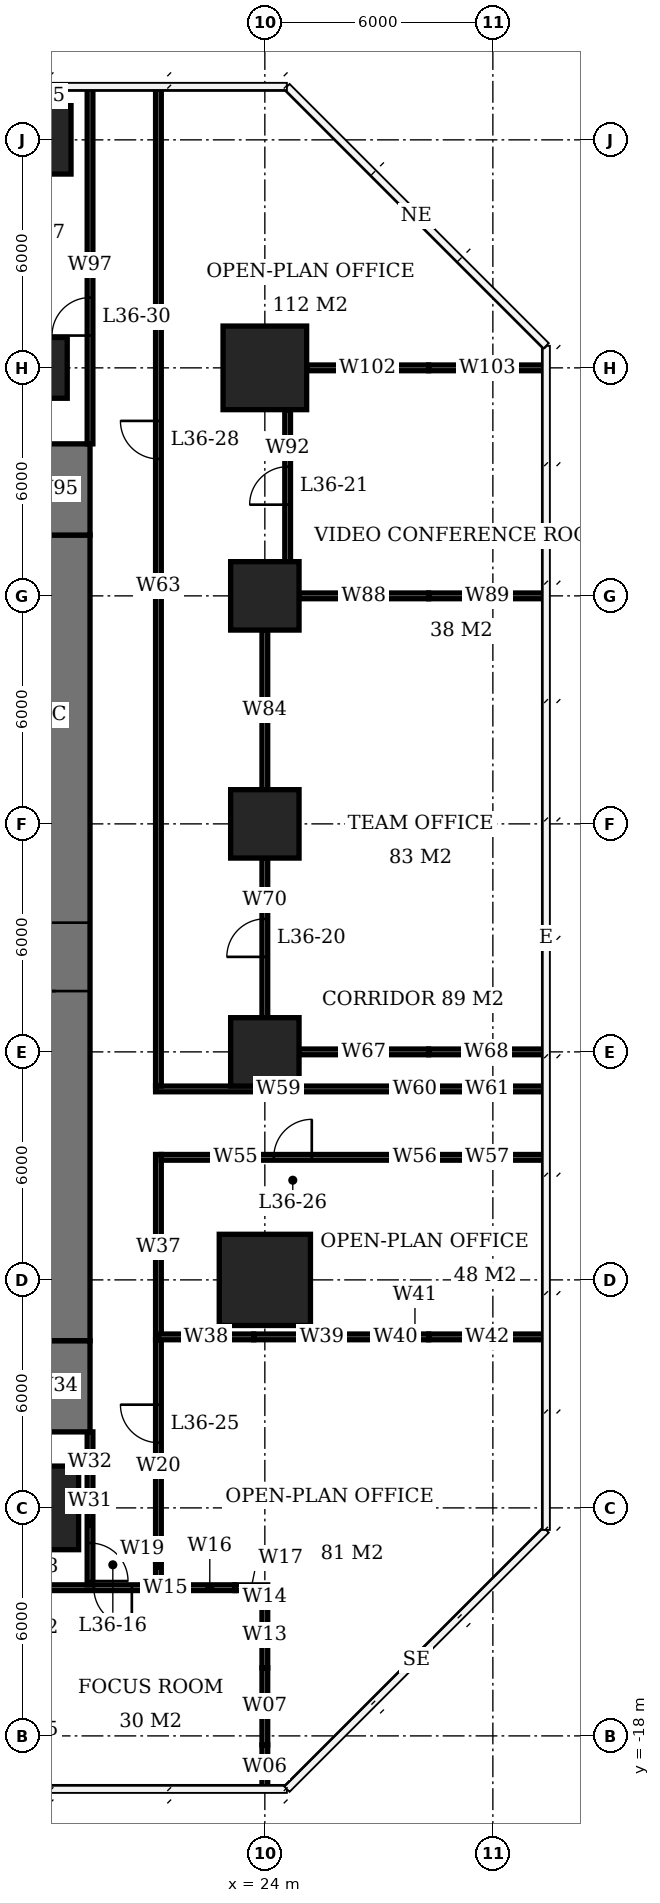
"""IFC4 building model, lengths in metres.
Left out: names, types, materials, properties, quantities, classifications, styles, units other than length and angle.
Written with IfcOpenShell. Run it as: python <this file> out.ifc"""

import sys

from ifc_helpers import new_model, si_unit, direction, frame, frame_2d, origin, origin_2d, place, context, subcontext, project, spatial, rectangle, extrude, element, fill, save


model = new_model("IFC4")
c1 = context("Model", 3, precision=1e-05, world=origin(), true_north=direction((0.0, 1.0)))
c2 = subcontext(c1, "Body", "Model", "MODEL_VIEW")
j1 = project(units=[si_unit("LENGTHUNIT", "METRE"), si_unit("PLANEANGLEUNIT", "RADIAN")], contexts=[c1])
p1 = place(None, origin())
s1 = spatial("IfcSite", under=j1, at=p1, CompositionType="ELEMENT")
p2 = place(p1, origin())
s2 = spatial("IfcBuilding", under=s1, at=p2, CompositionType="ELEMENT")
p3 = place(p2, frame((0.0, 0.0, 148.4)))
s3 = spatial("IfcBuildingStorey", under=s2, at=p3, CompositionType="ELEMENT", Elevation=148.4)
p4 = place(p3, frame((18.0, -12.0, 0.0), z_axis=(0.0, 0.0, 1.0), x_axis=(1.0, 0.0, 0.0)))
e1 = element("IfcColumn", 1, at=p4, inside=s3, PredefinedType="COLUMN", context=c2, shape_type="SweptSolid", body=[
    extrude(rectangle(XDim=2.2, YDim=2.2, at=origin_2d()), origin(), (0.0, 0.0, 1.0), 3.9),
])
p5 = place(p3, frame((18.0, 18.0, 0.0), z_axis=(0.0, 0.0, 1.0), x_axis=(1.0, 0.0, 0.0)))
e2 = element("IfcColumn", 2, at=p5, inside=s3, PredefinedType="COLUMN", context=c2, shape_type="SweptSolid", body=[
    extrude(rectangle(XDim=1.6, YDim=1.6, at=origin_2d()), origin(), (0.0, 0.0, 1.0), 3.9),
])
p6 = place(p3, frame((18.0, 24.0, 0.0), z_axis=(0.0, 0.0, 1.0), x_axis=(1.0, 0.0, 0.0)))
e3 = element("IfcColumn", 3, at=p6, inside=s3, PredefinedType="COLUMN", context=c2, shape_type="SweptSolid", body=[
    extrude(rectangle(XDim=1.8, YDim=1.8, at=origin_2d()), origin(), (0.0, 0.0, 1.0), 3.9),
])
p7 = place(p3, frame((24.0, -6.0, 0.0), z_axis=(0.0, 0.0, 1.0), x_axis=(1.0, 0.0, 0.0)))
e4 = element("IfcColumn", 4, at=p7, inside=s3, PredefinedType="COLUMN", context=c2, shape_type="SweptSolid", body=[
    extrude(rectangle(XDim=2.4, YDim=2.4, at=origin_2d()), origin(), (0.0, 0.0, 1.0), 3.9),
])
for number, where, z_axis, x_axis in (
    (5, (24.0, 0.0, 0.0), (0.0, 0.0, 1.0), (1.0, 0.0, 0.0)),
    (6, (24.0, 6.0, 0.0), (0.0, 0.0, 1.0), (1.0, 0.0, 0.0)),
    (7, (24.0, 12.0, 0.0), (0.0, 0.0, 1.0), (1.0, 0.0, 0.0)),
):
    element("IfcColumn", number, at=place(p3, frame(where, z_axis=z_axis, x_axis=x_axis)), inside=s3, PredefinedType="COLUMN", context=c2, shape_type="SweptSolid", body=[
        extrude(rectangle(XDim=1.8, YDim=1.8, at=origin_2d()), origin(), (0.0, 0.0, 1.0), 3.9),
    ])
p8 = place(p3, frame((24.0, 18.0, 0.0), z_axis=(0.0, 0.0, 1.0), x_axis=(1.0, 0.0, 0.0)))
e8 = element("IfcColumn", 8, at=p8, inside=s3, PredefinedType="COLUMN", context=c2, shape_type="SweptSolid", body=[
    extrude(rectangle(XDim=2.2, YDim=2.2, at=origin_2d()), origin(), (0.0, 0.0, 1.0), 3.9),
])
p9 = place(p3, frame((18.5, -7.6, 0.0), z_axis=(0.0, 0.0, 1.0), x_axis=(0.0, 1.0, 0.0)))
e9 = element("IfcWall", 9, at=p9, inside=s3, PredefinedType="SHEAR", context=c2, shape_type="SweptSolid", body=[
    extrude(rectangle(XDim=21.2, YDim=1.8, at=frame_2d((10.6, 0.0))), origin(), (0.0, 0.0, 1.0), 3.9),
])
p10 = place(p9, frame((9.2, 0.0, 0.0)))
e10 = element("IfcOpeningElement", 10, at=p10, cuts=e9, PredefinedType="OPENING", context=c2, shape_type="SweptSolid", body=[
    extrude(rectangle(XDim=1.8, YDim=2.4, at=frame_2d((0.9, 1.2))), frame((0.0, 0.91, 0.0), z_axis=(0.0, -1.0, 0.0), x_axis=(1.0, 0.0, 0.0)), (0.0, 0.0, 1.0), 1.82),
])
for number, where, z_axis, x_axis in (
    (11, (18.5, -10.0, 0.0), (0.0, 0.0, 1.0), (0.0, 1.0, 0.0)),
    (12, (18.5, 13.6, 0.0), (0.0, 0.0, 1.0), (0.0, 1.0, 0.0)),
):
    element("IfcWall", number, at=place(p3, frame(where, z_axis=z_axis, x_axis=x_axis)), inside=s3, PredefinedType="SHEAR", context=c2, shape_type="SweptSolid", body=[
        extrude(rectangle(XDim=2.4, YDim=1.8, at=frame_2d((1.2, 0.0))), origin(), (0.0, 0.0, 1.0), 3.9),
    ])
p11 = place(p3, frame((21.892, -14.1, 0.0), z_axis=(0.0, 0.0, 1.0), x_axis=(-1.0, 0.0, 0.0)))
e13 = element("IfcWall", 13, at=p11, inside=s3, PredefinedType="PARTITIONING", context=c2, shape_type="SweptSolid", body=[
    extrude(rectangle(XDim=3.817, YDim=0.15, at=frame_2d((1.909, 0.0))), origin(), (0.0, 0.0, 1.0), 2.65),
])
p12 = place(p11, frame((1.392, 0.0, 0.0)))
e14 = element("IfcOpeningElement", 14, at=p12, cuts=e13, PredefinedType="OPENING", context=c2, shape_type="SweptSolid", body=[
    extrude(rectangle(XDim=1.0, YDim=2.1, at=frame_2d((0.5, 1.05))), frame((0.0, 0.085, 0.0), z_axis=(0.0, -1.0, 0.0), x_axis=(1.0, 0.0, 0.0)), (0.0, 0.0, 1.0), 0.17),
])
p13 = place(p3, frame((21.892, -14.1, 0.0), z_axis=(0.0, 0.0, 1.0), x_axis=(1.0, 0.0, 0.0)))
e15 = element("IfcWall", 15, at=p13, inside=s3, PredefinedType="PARTITIONING", context=c2, shape_type="SweptSolid", body=[
    extrude(rectangle(XDim=1.318, YDim=0.15, at=frame_2d((0.659, 0.0))), origin(), (0.0, 0.0, 1.0), 3.65),
])
p14 = place(p3, frame((23.21, -14.1, 0.0), z_axis=(0.0, 0.0, 1.0), x_axis=(1.0, 0.0, 0.0)))
e16 = element("IfcWall", 16, at=p14, inside=s3, PredefinedType="PARTITIONING", context=c2, shape_type="SweptSolid", body=[
    extrude(rectangle(XDim=0.865, YDim=0.15, at=frame_2d((0.433, 0.0))), origin(), (0.0, 0.0, 1.0), 2.65),
])
p15 = place(p3, frame((24.9, 0.0, 0.0), z_axis=(0.0, 0.0, 1.0), x_axis=(1.0, 0.0, 0.0)))
e17 = element("IfcWall", 17, at=p15, inside=s3, PredefinedType="PARTITIONING", context=c2, shape_type="SweptSolid", body=[
    extrude(rectangle(XDim=3.41, YDim=0.15, at=frame_2d((1.705, 0.0))), origin(), (0.0, 0.0, 1.0), 2.65),
])
p16 = place(p3, frame((28.31, 0.0, 0.0), z_axis=(0.0, 0.0, 1.0), x_axis=(1.0, 0.0, 0.0)))
e18 = element("IfcWall", 18, at=p16, inside=s3, PredefinedType="PARTITIONING", context=c2, shape_type="SweptSolid", body=[
    extrude(rectangle(XDim=3.04, YDim=0.15, at=frame_2d((1.52, 0.0))), origin(), (0.0, 0.0, 1.0), 3.65),
])
p17 = place(p3, frame((24.9, 12.0, 0.0), z_axis=(0.0, 0.0, 1.0), x_axis=(1.0, 0.0, 0.0)))
e19 = element("IfcWall", 19, at=p17, inside=s3, PredefinedType="PARTITIONING", context=c2, shape_type="SweptSolid", body=[
    extrude(rectangle(XDim=3.41, YDim=0.15, at=frame_2d((1.705, 0.0))), origin(), (0.0, 0.0, 1.0), 2.65),
])
p18 = place(p3, frame((28.31, 12.0, 0.0), z_axis=(0.0, 0.0, 1.0), x_axis=(1.0, 0.0, 0.0)))
e20 = element("IfcWall", 20, at=p18, inside=s3, PredefinedType="PARTITIONING", context=c2, shape_type="SweptSolid", body=[
    extrude(rectangle(XDim=3.09, YDim=0.15, at=frame_2d((1.545, 0.0))), origin(), (0.0, 0.0, 1.0), 3.65),
])
p19 = place(p3, frame((25.1, 18.0, 0.0), z_axis=(0.0, 0.0, 1.0), x_axis=(1.0, 0.0, 0.0)))
e21 = element("IfcWall", 21, at=p19, inside=s3, PredefinedType="PARTITIONING", context=c2, shape_type="SweptSolid", body=[
    extrude(rectangle(XDim=3.21, YDim=0.15, at=frame_2d((1.605, 0.0))), origin(), (0.0, 0.0, 1.0), 2.65),
])
p20 = place(p3, frame((28.31, 18.0, 0.0), z_axis=(0.0, 0.0, 1.0), x_axis=(1.0, 0.0, 0.0)))
e22 = element("IfcWall", 22, at=p20, inside=s3, PredefinedType="PARTITIONING", context=c2, shape_type="SweptSolid", body=[
    extrude(rectangle(XDim=3.09, YDim=0.15, at=frame_2d((1.545, 0.0))), origin(), (0.0, 0.0, 1.0), 3.65),
])
p21 = place(p3, frame((24.0, -19.4, 0.0), z_axis=(0.0, 0.0, 1.0), x_axis=(0.0, 1.0, 0.0)))
e23 = element("IfcWall", 23, at=p21, inside=s3, PredefinedType="PARTITIONING", context=c2, shape_type="SweptSolid", body=[
    extrude(rectangle(XDim=1.163, YDim=0.15, at=frame_2d((0.582, 0.0))), origin(), (0.0, 0.0, 1.0), 3.65),
])
p22 = place(p3, frame((24.0, -18.237, 0.0), z_axis=(0.0, 0.0, 1.0), x_axis=(0.0, 1.0, 0.0)))
e24 = element("IfcWall", 24, at=p22, inside=s3, PredefinedType="PARTITIONING", context=c2, shape_type="SweptSolid", body=[
    extrude(rectangle(XDim=2.029, YDim=0.15, at=frame_2d((1.015, 0.0))), origin(), (0.0, 0.0, 1.0), 2.65),
])
p23 = place(p3, frame((24.0, -16.208, 0.0), z_axis=(0.0, 0.0, 1.0), x_axis=(0.0, 1.0, 0.0)))
e25 = element("IfcWall", 25, at=p23, inside=s3, PredefinedType="PARTITIONING", context=c2, shape_type="SweptSolid", body=[
    extrude(rectangle(XDim=1.718, YDim=0.15, at=frame_2d((0.859, 0.0))), origin(), (0.0, 0.0, 1.0), 3.65),
])
p24 = place(p3, frame((24.0, -14.49, 0.0), z_axis=(0.0, 0.0, 1.0), x_axis=(0.0, 1.0, 0.0)))
e26 = element("IfcWall", 26, at=p24, inside=s3, PredefinedType="PARTITIONING", context=c2, shape_type="SweptSolid", body=[
    extrude(rectangle(XDim=0.315, YDim=0.15, at=frame_2d((0.157, 0.0))), origin(), (0.0, 0.0, 1.0), 2.65),
])
p25 = place(p3, frame((24.0, 0.9, 0.0), z_axis=(0.0, 0.0, 1.0), x_axis=(0.0, 1.0, 0.0)))
e27 = element("IfcWall", 27, at=p25, inside=s3, PredefinedType="PARTITIONING", context=c2, shape_type="SweptSolid", body=[
    extrude(rectangle(XDim=4.2, YDim=0.15, at=frame_2d((2.1, 0.0))), origin(), (0.0, 0.0, 1.0), 3.65),
])
p26 = place(p25, frame((1.6, 0.0, 0.0)))
e28 = element("IfcOpeningElement", 28, at=p26, cuts=e27, PredefinedType="OPENING", context=c2, shape_type="SweptSolid", body=[
    extrude(rectangle(XDim=1.0, YDim=2.1, at=frame_2d((0.5, 1.05))), frame((0.0, 0.085, 0.0), z_axis=(0.0, -1.0, 0.0), x_axis=(1.0, 0.0, 0.0)), (0.0, 0.0, 1.0), 0.17),
])
p27 = place(p3, frame((24.0, 6.9, 0.0), z_axis=(0.0, 0.0, 1.0), x_axis=(0.0, 1.0, 0.0)))
e29 = element("IfcWall", 29, at=p27, inside=s3, PredefinedType="PARTITIONING", context=c2, shape_type="SweptSolid", body=[
    extrude(rectangle(XDim=4.2, YDim=0.15, at=frame_2d((2.1, 0.0))), origin(), (0.0, 0.0, 1.0), 3.65),
])
p28 = place(p3, frame((24.6, 12.9, 0.0), z_axis=(0.0, 0.0, 1.0), x_axis=(0.0, 1.0, 0.0)))
e30 = element("IfcWall", 30, at=p28, inside=s3, PredefinedType="PARTITIONING", context=c2, shape_type="SweptSolid", body=[
    extrude(rectangle(XDim=4.0, YDim=0.15, at=frame_2d((2.0, 0.0))), origin(), (0.0, 0.0, 1.0), 3.65),
])
p29 = place(p28, frame((1.5, 0.0, 0.0)))
e31 = element("IfcOpeningElement", 31, at=p29, cuts=e30, PredefinedType="OPENING", context=c2, shape_type="SweptSolid", body=[
    extrude(rectangle(XDim=1.0, YDim=2.1, at=frame_2d((0.5, 1.05))), frame((0.0, 0.085, 0.0), z_axis=(0.0, -1.0, 0.0), x_axis=(1.0, 0.0, 0.0)), (0.0, 0.0, 1.0), 0.17),
])
p30 = place(p3, frame((19.4, -11.608, 0.0), z_axis=(0.0, 0.0, 1.0), x_axis=(0.0, -1.0, 0.0)))
e32 = element("IfcWall", 32, at=p30, inside=s3, PredefinedType="PARTITIONING", context=c2, shape_type="SweptSolid", body=[
    extrude(rectangle(XDim=2.417, YDim=0.15, at=frame_2d((1.208, 0.0))), origin(), (0.0, 0.0, 1.0), 2.65),
])
p31 = place(p30, frame((1.317, 0.0, 0.0)))
e33 = element("IfcOpeningElement", 33, at=p31, cuts=e32, PredefinedType="OPENING", context=c2, shape_type="SweptSolid", body=[
    extrude(rectangle(XDim=1.0, YDim=2.1, at=frame_2d((0.5, 1.05))), frame((0.0, 0.085, 0.0), z_axis=(0.0, -1.0, 0.0), x_axis=(1.0, 0.0, 0.0)), (0.0, 0.0, 1.0), 0.17),
])
p32 = place(p3, frame((19.4, -11.608, 0.0), z_axis=(0.0, 0.0, 1.0), x_axis=(0.0, 1.0, 0.0)))
e34 = element("IfcWall", 34, at=p32, inside=s3, PredefinedType="PARTITIONING", context=c2, shape_type="SweptSolid", body=[
    extrude(rectangle(XDim=1.608, YDim=0.15, at=frame_2d((0.804, 0.0))), origin(), (0.0, 0.0, 1.0), 3.65),
])
p33 = place(p3, frame((19.4, 16.0, 0.0), z_axis=(0.0, 0.0, 1.0), x_axis=(0.0, 1.0, 0.0)))
e35 = element("IfcWall", 35, at=p33, inside=s3, PredefinedType="PARTITIONING", context=c2, shape_type="SweptSolid", body=[
    extrude(rectangle(XDim=9.4, YDim=0.15, at=frame_2d((4.7, 0.0))), origin(), (0.0, 0.0, 1.0), 3.65),
])
p34 = place(p33, frame((2.85, 0.0, 0.0)))
e36 = element("IfcOpeningElement", 36, at=p34, cuts=e35, PredefinedType="OPENING", context=c2, shape_type="SweptSolid", body=[
    extrude(rectangle(XDim=1.0, YDim=2.1, at=frame_2d((0.5, 1.05))), frame((0.0, 0.085, 0.0), z_axis=(0.0, -1.0, 0.0), x_axis=(1.0, 0.0, 0.0)), (0.0, 0.0, 1.0), 0.17),
])
p35 = place(p3, frame((21.2, -14.025, 0.0), z_axis=(0.0, 0.0, 1.0), x_axis=(0.0, 1.0, 0.0)))
e37 = element("IfcWall", 37, at=p35, inside=s3, PredefinedType="PARTITIONING", context=c2, shape_type="SweptSolid", body=[
    extrude(rectangle(XDim=0.617, YDim=0.15, at=frame_2d((0.309, 0.0))), origin(), (0.0, 0.0, 1.0), 2.65),
])
p36 = place(p3, frame((21.2, -13.408, 0.0), z_axis=(0.0, 0.0, 1.0), x_axis=(0.0, 1.0, 0.0)))
e38 = element("IfcWall", 38, at=p36, inside=s3, PredefinedType="PARTITIONING", context=c2, shape_type="SweptSolid", body=[
    extrude(rectangle(XDim=5.833, YDim=0.15, at=frame_2d((2.917, 0.0))), origin(), (0.0, 0.0, 1.0), 3.65),
])
p37 = place(p36, frame((3.124, 0.0, 0.0)))
e39 = element("IfcOpeningElement", 39, at=p37, cuts=e38, PredefinedType="OPENING", context=c2, shape_type="SweptSolid", body=[
    extrude(rectangle(XDim=1.0, YDim=2.1, at=frame_2d((0.5, 1.05))), frame((0.0, 0.085, 0.0), z_axis=(0.0, -1.0, 0.0), x_axis=(1.0, 0.0, 0.0)), (0.0, 0.0, 1.0), 0.17),
])
p38 = place(p3, frame((21.2, -7.575, 0.0), z_axis=(0.0, 0.0, 1.0), x_axis=(0.0, 1.0, 0.0)))
e40 = element("IfcWall", 40, at=p38, inside=s3, PredefinedType="PARTITIONING", context=c2, shape_type="SweptSolid", body=[
    extrude(rectangle(XDim=4.875, YDim=0.15, at=frame_2d((2.438, 0.0))), origin(), (0.0, 0.0, 1.0), 3.65),
])
p39 = place(p3, frame((21.2, -7.5, 0.0), z_axis=(0.0, 0.0, 1.0), x_axis=(1.0, 0.0, 0.0)))
e41 = element("IfcWall", 41, at=p39, inside=s3, PredefinedType="PARTITIONING", context=c2, shape_type="SweptSolid", body=[
    extrude(rectangle(XDim=2.508, YDim=0.15, at=frame_2d((1.254, 0.0))), origin(), (0.0, 0.0, 1.0), 3.65),
])
p40 = place(p3, frame((23.708, -7.5, 0.0), z_axis=(0.0, 0.0, 1.0), x_axis=(1.0, 0.0, 0.0)))
e42 = element("IfcWall", 42, at=p40, inside=s3, PredefinedType="PARTITIONING", context=c2, shape_type="SweptSolid", body=[
    extrude(rectangle(XDim=3.584, YDim=0.15, at=frame_2d((1.792, 0.0))), origin(), (0.0, 0.0, 1.0), 2.65),
])
p41 = place(p3, frame((27.292, -7.5, 0.0), z_axis=(0.0, 0.0, 1.0), x_axis=(1.0, 0.0, 0.0)))
e43 = element("IfcWall", 43, at=p41, inside=s3, PredefinedType="PARTITIONING", context=c2, shape_type="SweptSolid", body=[
    extrude(rectangle(XDim=0.298, YDim=0.15, at=frame_2d((0.149, 0.0))), origin(), (0.0, 0.0, 1.0), 3.65),
])
p42 = place(p3, frame((27.59, -7.5, 0.0), z_axis=(0.0, 0.0, 1.0), x_axis=(1.0, 0.0, 0.0)))
e44 = element("IfcWall", 44, at=p42, inside=s3, PredefinedType="PARTITIONING", context=c2, shape_type="SweptSolid", body=[
    extrude(rectangle(XDim=0.72, YDim=0.15, at=frame_2d((0.36, 0.0))), origin(), (0.0, 0.0, 1.0), 2.65),
])
p43 = place(p3, frame((28.31, -7.5, 0.0), z_axis=(0.0, 0.0, 1.0), x_axis=(1.0, 0.0, 0.0)))
e45 = element("IfcWall", 45, at=p43, inside=s3, PredefinedType="PARTITIONING", context=c2, shape_type="SweptSolid", body=[
    extrude(rectangle(XDim=3.09, YDim=0.15, at=frame_2d((1.545, 0.0))), origin(), (0.0, 0.0, 1.0), 3.65),
])
p44 = place(p3, frame((21.275, -2.775, 0.0), z_axis=(0.0, 0.0, 1.0), x_axis=(1.0, 0.0, 0.0)))
e46 = element("IfcWall", 46, at=p44, inside=s3, PredefinedType="PARTITIONING", context=c2, shape_type="SweptSolid", body=[
    extrude(rectangle(XDim=6.315, YDim=0.15, at=frame_2d((3.158, 0.0))), origin(), (0.0, 0.0, 1.0), 3.65),
])
p45 = place(p44, frame((2.96, 0.0, 0.0)))
e47 = element("IfcOpeningElement", 47, at=p45, cuts=e46, PredefinedType="OPENING", context=c2, shape_type="SweptSolid", body=[
    extrude(rectangle(XDim=1.0, YDim=2.1, at=frame_2d((0.5, 1.05))), frame((0.0, 0.085, 0.0), z_axis=(0.0, -1.0, 0.0), x_axis=(1.0, 0.0, 0.0)), (0.0, 0.0, 1.0), 0.17),
])
p46 = place(p3, frame((27.59, -2.775, 0.0), z_axis=(0.0, 0.0, 1.0), x_axis=(1.0, 0.0, 0.0)))
e48 = element("IfcWall", 48, at=p46, inside=s3, PredefinedType="PARTITIONING", context=c2, shape_type="SweptSolid", body=[
    extrude(rectangle(XDim=0.72, YDim=0.15, at=frame_2d((0.36, 0.0))), origin(), (0.0, 0.0, 1.0), 2.65),
])
p47 = place(p3, frame((28.31, -2.775, 0.0), z_axis=(0.0, 0.0, 1.0), x_axis=(1.0, 0.0, 0.0)))
e49 = element("IfcWall", 49, at=p47, inside=s3, PredefinedType="PARTITIONING", context=c2, shape_type="SweptSolid", body=[
    extrude(rectangle(XDim=3.09, YDim=0.15, at=frame_2d((1.545, 0.0))), origin(), (0.0, 0.0, 1.0), 3.65),
])
p48 = place(p3, frame((21.2, -0.9, 0.0), z_axis=(0.0, 0.0, 1.0), x_axis=(0.0, 1.0, 0.0)))
e50 = element("IfcWall", 50, at=p48, inside=s3, PredefinedType="PARTITIONING", context=c2, shape_type="SweptSolid", body=[
    extrude(rectangle(XDim=26.3, YDim=0.15, at=frame_2d((13.15, 0.0))), origin(), (0.0, 0.0, 1.0), 3.65),
])
p49 = place(p48, frame((16.504, 0.0, 0.0)))
e51 = element("IfcOpeningElement", 51, at=p49, cuts=e50, PredefinedType="OPENING", context=c2, shape_type="SweptSolid", body=[
    extrude(rectangle(XDim=1.0, YDim=2.1, at=frame_2d((0.5, 1.05))), frame((0.0, 0.085, 0.0), z_axis=(0.0, -1.0, 0.0), x_axis=(1.0, 0.0, 0.0)), (0.0, 0.0, 1.0), 0.17),
])
p50 = place(p3, frame((21.125, -0.975, 0.0), z_axis=(0.0, 0.0, 1.0), x_axis=(1.0, 0.0, 0.0)))
e52 = element("IfcWall", 52, at=p50, inside=s3, PredefinedType="PARTITIONING", context=c2, shape_type="SweptSolid", body=[
    extrude(rectangle(XDim=6.465, YDim=0.15, at=frame_2d((3.232, 0.0))), origin(), (0.0, 0.0, 1.0), 3.65),
])
p51 = place(p3, frame((27.59, -0.975, 0.0), z_axis=(0.0, 0.0, 1.0), x_axis=(1.0, 0.0, 0.0)))
e53 = element("IfcWall", 53, at=p51, inside=s3, PredefinedType="PARTITIONING", context=c2, shape_type="SweptSolid", body=[
    extrude(rectangle(XDim=0.72, YDim=0.15, at=frame_2d((0.36, 0.0))), origin(), (0.0, 0.0, 1.0), 2.65),
])
p52 = place(p3, frame((28.31, -0.975, 0.0), z_axis=(0.0, 0.0, 1.0), x_axis=(1.0, 0.0, 0.0)))
e54 = element("IfcWall", 54, at=p52, inside=s3, PredefinedType="PARTITIONING", context=c2, shape_type="SweptSolid", body=[
    extrude(rectangle(XDim=3.09, YDim=0.15, at=frame_2d((1.545, 0.0))), origin(), (0.0, 0.0, 1.0), 3.65),
])
p53 = place(p10, origin())
e55 = element("IfcDoor", 55, at=p53, inside=s3, OperationType="DOUBLE_DOOR_SINGLE_SWING", PredefinedType="DOOR", context=c2, shape_type="SweptSolid", body=[
    extrude(rectangle(XDim=1.8, YDim=2.4, at=frame_2d((0.9, 1.2))), frame((0.0, 0.025, 0.0), z_axis=(0.0, -1.0, 0.0), x_axis=(1.0, 0.0, 0.0)), (0.0, 0.0, 1.0), 0.05),
])
fill(e10, e55)
p54 = place(p12, origin())
e56 = element("IfcDoor", 56, at=p54, inside=s3, OperationType="SINGLE_SWING_LEFT", PredefinedType="DOOR", context=c2, shape_type="SweptSolid", body=[
    extrude(rectangle(XDim=1.0, YDim=2.1, at=frame_2d((0.5, 1.05))), frame((0.0, 0.025, 0.0), z_axis=(0.0, -1.0, 0.0), x_axis=(1.0, 0.0, 0.0)), (0.0, 0.0, 1.0), 0.05),
])
fill(e14, e56)
p55 = place(p26, origin())
e57 = element("IfcDoor", 57, at=p55, inside=s3, OperationType="SINGLE_SWING_LEFT", PredefinedType="DOOR", context=c2, shape_type="SweptSolid", body=[
    extrude(rectangle(XDim=1.0, YDim=2.1, at=frame_2d((0.5, 1.05))), frame((0.0, 0.025, 0.0), z_axis=(0.0, -1.0, 0.0), x_axis=(1.0, 0.0, 0.0)), (0.0, 0.0, 1.0), 0.05),
])
fill(e28, e57)
p56 = place(p29, origin())
e58 = element("IfcDoor", 58, at=p56, inside=s3, OperationType="SINGLE_SWING_LEFT", PredefinedType="DOOR", context=c2, shape_type="SweptSolid", body=[
    extrude(rectangle(XDim=1.0, YDim=2.1, at=frame_2d((0.5, 1.05))), frame((0.0, 0.025, 0.0), z_axis=(0.0, -1.0, 0.0), x_axis=(1.0, 0.0, 0.0)), (0.0, 0.0, 1.0), 0.05),
])
fill(e31, e58)
p57 = place(p37, origin())
e59 = element("IfcDoor", 59, at=p57, inside=s3, OperationType="SINGLE_SWING_RIGHT", PredefinedType="DOOR", context=c2, shape_type="SweptSolid", body=[
    extrude(rectangle(XDim=1.0, YDim=2.1, at=frame_2d((0.5, 1.05))), frame((0.0, 0.025, 0.0), z_axis=(0.0, -1.0, 0.0), x_axis=(1.0, 0.0, 0.0)), (0.0, 0.0, 1.0), 0.05),
])
fill(e39, e59)
p58 = place(p45, origin())
e60 = element("IfcDoor", 60, at=p58, inside=s3, OperationType="SINGLE_SWING_RIGHT", PredefinedType="DOOR", context=c2, shape_type="SweptSolid", body=[
    extrude(rectangle(XDim=1.0, YDim=2.1, at=frame_2d((0.5, 1.05))), frame((0.0, 0.025, 0.0), z_axis=(0.0, -1.0, 0.0), x_axis=(1.0, 0.0, 0.0)), (0.0, 0.0, 1.0), 0.05),
])
fill(e47, e60)
p59 = place(p49, origin())
e61 = element("IfcDoor", 61, at=p59, inside=s3, OperationType="SINGLE_SWING_RIGHT", PredefinedType="DOOR", context=c2, shape_type="SweptSolid", body=[
    extrude(rectangle(XDim=1.0, YDim=2.1, at=frame_2d((0.5, 1.05))), frame((0.0, 0.025, 0.0), z_axis=(0.0, -1.0, 0.0), x_axis=(1.0, 0.0, 0.0)), (0.0, 0.0, 1.0), 0.05),
])
fill(e51, e61)
p60 = place(p34, origin())
e62 = element("IfcDoor", 62, at=p60, inside=s3, OperationType="SINGLE_SWING_LEFT", PredefinedType="DOOR", context=c2, shape_type="SweptSolid", body=[
    extrude(rectangle(XDim=1.0, YDim=2.1, at=frame_2d((0.5, 1.05))), frame((0.0, 0.025, 0.0), z_axis=(0.0, -1.0, 0.0), x_axis=(1.0, 0.0, 0.0)), (0.0, 0.0, 1.0), 0.05),
])
fill(e36, e62)
p61 = place(p31, origin())
e63 = element("IfcDoor", 63, at=p61, inside=s3, OperationType="SINGLE_SWING_RIGHT", PredefinedType="DOOR", context=c2, shape_type="SweptSolid", body=[
    extrude(rectangle(XDim=1.0, YDim=2.1, at=frame_2d((0.5, 1.05))), frame((0.0, 0.025, 0.0), z_axis=(0.0, -1.0, 0.0), x_axis=(1.0, 0.0, 0.0)), (0.0, 0.0, 1.0), 0.05),
])
fill(e33, e63)
save(model, sys.argv[1])
